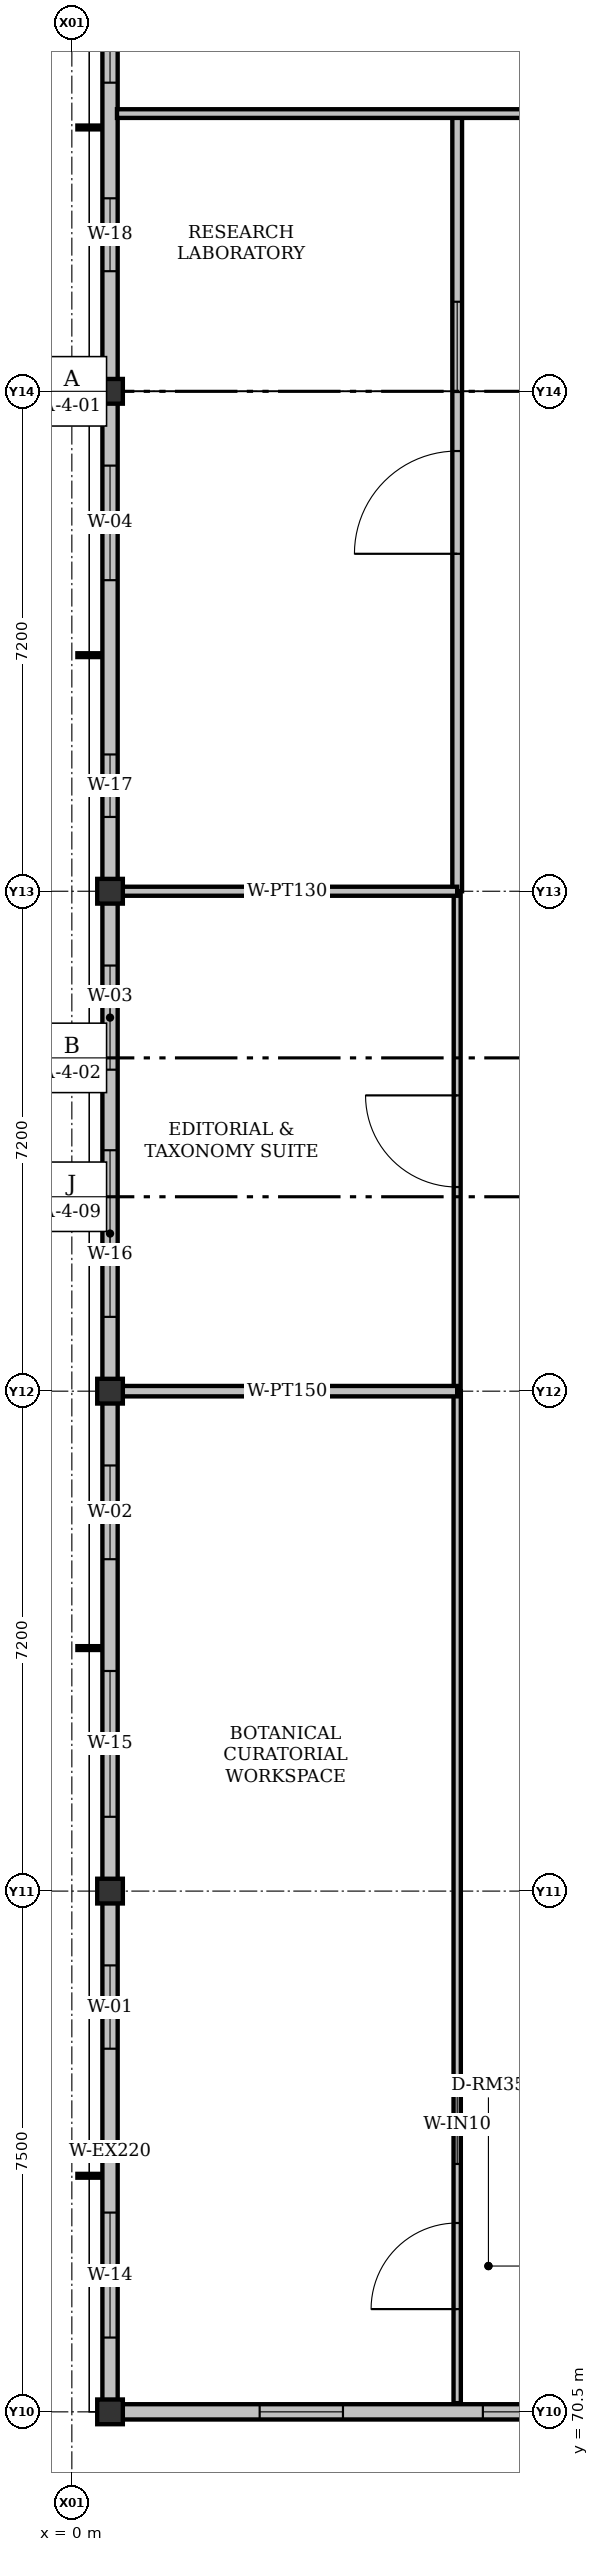
"""IFC4 building model, lengths in metres.
Left out: names, types, materials, properties, quantities, classifications, styles, units other than length and angle.
Written with IfcOpenShell. Run it as: python <this file> out.ifc"""

import sys

from ifc_helpers import new_model, si_unit, direction, frame, frame_2d, origin, origin_2d, place, context, subcontext, project, spatial, rectangle, i_section, extrude, element, fill, save


model = new_model("IFC4")
c1 = context("Model", 3, precision=1e-05, world=origin(), true_north=direction((0.0, 1.0)))
c2 = subcontext(c1, "Body", "Model", "MODEL_VIEW")
j1 = project(units=[si_unit("LENGTHUNIT", "METRE"), si_unit("PLANEANGLEUNIT", "RADIAN")], contexts=[c1])
p1 = place(None, origin())
s1 = spatial("IfcSite", under=j1, at=p1, CompositionType="ELEMENT")
p2 = place(p1, origin())
s2 = spatial("IfcBuilding", under=s1, at=p2, CompositionType="ELEMENT")
p3 = place(p2, frame((0.0, 0.0, 56.1)))
s3 = spatial("IfcBuildingStorey", under=s2, at=p3, CompositionType="ELEMENT", Elevation=56.1)
for number, where, z_axis, x_axis in (
    (1, (0.55, 70.5, 0.0), (0.0, 0.0, 1.0), (1.0, 0.0, 0.0)),
    (2, (0.55, 78.0, 0.0), (0.0, 0.0, 1.0), (1.0, 0.0, 0.0)),
    (3, (0.55, 85.2, 0.0), (0.0, 0.0, 1.0), (1.0, 0.0, 0.0)),
    (4, (0.55, 92.4, 0.0), (0.0, 0.0, 1.0), (1.0, 0.0, 0.0)),
    (5, (0.55, 99.6, 0.0), (0.0, 0.0, 1.0), (1.0, 0.0, 0.0)),
):
    element("IfcColumn", number, at=place(p3, frame(where, z_axis=z_axis, x_axis=x_axis)), inside=s3, PredefinedType="COLUMN", context=c2, shape_type="SweptSolid", body=[
        extrude(i_section(OverallWidth=0.369, OverallDepth=0.356, WebThickness=0.011, FlangeThickness=0.018, FilletRadius=0.015, at=origin_2d()), origin(), (0.0, 0.0, 1.0), 4.2),
    ])
p4 = place(p3, frame((0.55, 70.5, 0.0), z_axis=(0.0, 0.0, 1.0), x_axis=(0.0, 1.0, 0.0)))
e6 = element("IfcWall", 6, at=p4, inside=s3, PredefinedType="SOLIDWALL", context=c2, shape_type="SweptSolid", body=[
    extrude(rectangle(XDim=7.5, YDim=0.22, at=frame_2d((3.75, 0.0))), origin(), (0.0, 0.0, 1.0), 3.562),
])
p5 = place(p4, frame((1.07, 0.0, 0.92)))
e7 = element("IfcOpeningElement", 7, at=p5, cuts=e6, PredefinedType="OPENING", context=c2, shape_type="SweptSolid", body=[
    extrude(rectangle(XDim=1.8, YDim=1.7, at=frame_2d((0.9, 0.85))), frame((0.0, 0.11, 0.0), z_axis=(0.0, -1.0, 0.0), x_axis=(1.0, 0.0, 0.0)), (0.0, 0.0, 1.0), 0.22),
])
p6 = place(p4, frame((5.23, 0.0, 0.92)))
e8 = element("IfcOpeningElement", 8, at=p6, cuts=e6, PredefinedType="OPENING", context=c2, shape_type="SweptSolid", body=[
    extrude(rectangle(XDim=1.2, YDim=1.4, at=frame_2d((0.6, 0.7))), frame((0.0, 0.11, 0.0), z_axis=(0.0, -1.0, 0.0), x_axis=(1.0, 0.0, 0.0)), (0.0, 0.0, 1.0), 0.22),
])
p7 = place(p3, frame((0.55, 78.0, 0.0), z_axis=(0.0, 0.0, 1.0), x_axis=(0.0, 1.0, 0.0)))
e9 = element("IfcWall", 9, at=p7, inside=s3, PredefinedType="SOLIDWALL", context=c2, shape_type="SweptSolid", body=[
    extrude(rectangle(XDim=7.2, YDim=0.22, at=frame_2d((3.6, 0.0))), origin(), (0.0, 0.0, 1.0), 3.562),
])
p8 = place(p7, frame((1.07, 0.0, 0.92)))
e10 = element("IfcOpeningElement", 10, at=p8, cuts=e9, PredefinedType="OPENING", context=c2, shape_type="SweptSolid", body=[
    extrude(rectangle(XDim=2.1, YDim=1.7, at=frame_2d((1.05, 0.85))), frame((0.0, 0.11, 0.0), z_axis=(0.0, -1.0, 0.0), x_axis=(1.0, 0.0, 0.0)), (0.0, 0.0, 1.0), 0.22),
])
p9 = place(p7, frame((4.78, 0.0, 0.92)))
e11 = element("IfcOpeningElement", 11, at=p9, cuts=e9, PredefinedType="OPENING", context=c2, shape_type="SweptSolid", body=[
    extrude(rectangle(XDim=1.35, YDim=1.4, at=frame_2d((0.675, 0.7))), frame((0.0, 0.11, 0.0), z_axis=(0.0, -1.0, 0.0), x_axis=(1.0, 0.0, 0.0)), (0.0, 0.0, 1.0), 0.22),
])
p10 = place(p3, frame((0.55, 85.2, 0.0), z_axis=(0.0, 0.0, 1.0), x_axis=(0.0, 1.0, 0.0)))
e12 = element("IfcWall", 12, at=p10, inside=s3, PredefinedType="SOLIDWALL", context=c2, shape_type="SweptSolid", body=[
    extrude(rectangle(XDim=7.2, YDim=0.22, at=frame_2d((3.6, 0.0))), origin(), (0.0, 0.0, 1.0), 3.562),
])
p11 = place(p10, frame((1.07, 0.0, 0.92)))
e13 = element("IfcOpeningElement", 13, at=p11, cuts=e12, PredefinedType="OPENING", context=c2, shape_type="SweptSolid", body=[
    extrude(rectangle(XDim=2.4, YDim=1.7, at=frame_2d((1.2, 0.85))), frame((0.0, 0.11, 0.0), z_axis=(0.0, -1.0, 0.0), x_axis=(1.0, 0.0, 0.0)), (0.0, 0.0, 1.0), 0.22),
])
p12 = place(p10, frame((4.63, 0.0, 0.92)))
e14 = element("IfcOpeningElement", 14, at=p12, cuts=e12, PredefinedType="OPENING", context=c2, shape_type="SweptSolid", body=[
    extrude(rectangle(XDim=1.5, YDim=1.4, at=frame_2d((0.75, 0.7))), frame((0.0, 0.11, 0.0), z_axis=(0.0, -1.0, 0.0), x_axis=(1.0, 0.0, 0.0)), (0.0, 0.0, 1.0), 0.22),
])
p13 = place(p3, frame((0.55, 92.4, 0.0), z_axis=(0.0, 0.0, 1.0), x_axis=(0.0, 1.0, 0.0)))
e15 = element("IfcWall", 15, at=p13, inside=s3, PredefinedType="SOLIDWALL", context=c2, shape_type="SweptSolid", body=[
    extrude(rectangle(XDim=7.2, YDim=0.22, at=frame_2d((3.6, 0.0))), origin(), (0.0, 0.0, 1.0), 3.562),
])
p14 = place(p13, frame((1.07, 0.0, 0.92)))
e16 = element("IfcOpeningElement", 16, at=p14, cuts=e15, PredefinedType="OPENING", context=c2, shape_type="SweptSolid", body=[
    extrude(rectangle(XDim=0.9, YDim=1.3, at=frame_2d((0.45, 0.65))), frame((0.0, 0.11, 0.0), z_axis=(0.0, -1.0, 0.0), x_axis=(1.0, 0.0, 0.0)), (0.0, 0.0, 1.0), 0.22),
])
p15 = place(p13, frame((4.48, 0.0, 0.92)))
e17 = element("IfcOpeningElement", 17, at=p15, cuts=e15, PredefinedType="OPENING", context=c2, shape_type="SweptSolid", body=[
    extrude(rectangle(XDim=1.65, YDim=1.4, at=frame_2d((0.825, 0.7))), frame((0.0, 0.11, 0.0), z_axis=(0.0, -1.0, 0.0), x_axis=(1.0, 0.0, 0.0)), (0.0, 0.0, 1.0), 0.22),
])
p16 = place(p3, frame((0.55, 99.6, 0.0), z_axis=(0.0, 0.0, 1.0), x_axis=(0.0, 1.0, 0.0)))
e18 = element("IfcWall", 18, at=p16, inside=s3, PredefinedType="SOLIDWALL", context=c2, shape_type="SweptSolid", body=[
    extrude(rectangle(XDim=7.2, YDim=0.22, at=frame_2d((3.6, 0.0))), origin(), (0.0, 0.0, 1.0), 3.562),
])
p17 = place(p16, frame((1.73, 0.0, 0.92)))
e19 = element("IfcOpeningElement", 19, at=p17, cuts=e18, PredefinedType="OPENING", context=c2, shape_type="SweptSolid", body=[
    extrude(rectangle(XDim=1.05, YDim=1.3, at=frame_2d((0.525, 0.65))), frame((0.0, 0.11, 0.0), z_axis=(0.0, -1.0, 0.0), x_axis=(1.0, 0.0, 0.0)), (0.0, 0.0, 1.0), 0.22),
])
p18 = place(p16, frame((4.445, 0.0, 0.92)))
e20 = element("IfcOpeningElement", 20, at=p18, cuts=e18, PredefinedType="OPENING", context=c2, shape_type="SweptSolid", body=[
    extrude(rectangle(XDim=1.8, YDim=1.55, at=frame_2d((0.9, 0.775))), frame((0.0, 0.11, 0.0), z_axis=(0.0, -1.0, 0.0), x_axis=(1.0, 0.0, 0.0)), (0.0, 0.0, 1.0), 0.22),
])
p19 = place(p3, frame((7.85, 70.5, 0.0), z_axis=(0.0, 0.0, 1.0), x_axis=(-1.0, 0.0, 0.0)))
e21 = element("IfcWall", 21, at=p19, inside=s3, PredefinedType="SOLIDWALL", context=c2, shape_type="SweptSolid", body=[
    extrude(rectangle(XDim=7.3, YDim=0.22, at=frame_2d((3.65, 0.0))), origin(), (0.0, 0.0, 1.0), 3.562),
])
p20 = place(p19, frame((0.88, 0.0, 0.92)))
e22 = element("IfcOpeningElement", 22, at=p20, cuts=e21, PredefinedType="OPENING", context=c2, shape_type="SweptSolid", body=[
    extrude(rectangle(XDim=1.05, YDim=1.3, at=frame_2d((0.525, 0.65))), frame((0.0, 0.11, 0.0), z_axis=(0.0, -1.0, 0.0), x_axis=(1.0, 0.0, 0.0)), (0.0, 0.0, 1.0), 0.22),
])
p21 = place(p19, frame((3.945, 0.0, 0.92)))
e23 = element("IfcOpeningElement", 23, at=p21, cuts=e21, PredefinedType="OPENING", context=c2, shape_type="SweptSolid", body=[
    extrude(rectangle(XDim=1.2, YDim=1.4, at=frame_2d((0.6, 0.7))), frame((0.0, 0.11, 0.0), z_axis=(0.0, -1.0, 0.0), x_axis=(1.0, 0.0, 0.0)), (0.0, 0.0, 1.0), 0.22),
])
p22 = place(p3, frame((5.55, 70.625, 0.0), z_axis=(0.0, 0.0, 1.0), x_axis=(0.0, 1.0, 0.0)))
e24 = element("IfcWall", 24, at=p22, inside=s3, PredefinedType="PARTITIONING", context=c2, shape_type="SweptSolid", body=[
    extrude(rectangle(XDim=14.575, YDim=0.105, at=frame_2d((7.288, 0.0))), origin(), (0.0, 0.0, 1.0), 3.436),
])
p23 = place(p22, frame((1.355, 0.0, 0.0)))
e25 = element("IfcOpeningElement", 25, at=p23, cuts=e24, PredefinedType="OPENING", context=c2, shape_type="SweptSolid", body=[
    extrude(rectangle(XDim=1.24, YDim=2.18, at=frame_2d((0.62, 1.09))), frame((0.0, 0.052, 0.0), z_axis=(0.0, -1.0, 0.0), x_axis=(1.0, 0.0, 0.0)), (0.0, 0.0, 1.0), 0.105),
])
p24 = place(p22, frame((3.445, 0.0, 0.92)))
e26 = element("IfcOpeningElement", 26, at=p24, cuts=e24, PredefinedType="OPENING", context=c2, shape_type="SweptSolid", body=[
    extrude(rectangle(XDim=1.15, YDim=1.3, at=frame_2d((0.575, 0.65))), frame((0.0, 0.052, 0.0), z_axis=(0.0, -1.0, 0.0), x_axis=(1.0, 0.0, 0.0)), (0.0, 0.0, 1.0), 0.105),
])
p25 = place(p3, frame((5.55, 85.2, 0.0), z_axis=(0.0, 0.0, 1.0), x_axis=(0.0, 1.0, 0.0)))
e27 = element("IfcWall", 27, at=p25, inside=s3, PredefinedType="PARTITIONING", context=c2, shape_type="SweptSolid", body=[
    extrude(rectangle(XDim=7.2, YDim=0.1, at=frame_2d((3.6, 0.0))), origin(), (0.0, 0.0, 1.0), 3.436),
])
p26 = place(p25, frame((2.94, 0.0, 0.0)))
e28 = element("IfcOpeningElement", 28, at=p26, cuts=e27, PredefinedType="OPENING", context=c2, shape_type="SweptSolid", body=[
    extrude(rectangle(XDim=1.32, YDim=2.18, at=frame_2d((0.66, 1.09))), frame((0.0, 0.05, 0.0), z_axis=(0.0, -1.0, 0.0), x_axis=(1.0, 0.0, 0.0)), (0.0, 0.0, 1.0), 0.1),
])
p27 = place(p3, frame((0.65, 85.2, 0.0), z_axis=(0.0, 0.0, 1.0), x_axis=(1.0, 0.0, 0.0)))
e29 = element("IfcWall", 29, at=p27, inside=s3, PredefinedType="PARTITIONING", context=c2, shape_type="SweptSolid", body=[
    extrude(rectangle(XDim=4.9, YDim=0.15, at=frame_2d((2.45, 0.0))), origin(), (0.0, 0.0, 1.0), 3.436),
])
p28 = place(p3, frame((5.55, 92.4, 0.0), z_axis=(0.0, 0.0, 1.0), x_axis=(0.0, 1.0, 0.0)))
e30 = element("IfcWall", 30, at=p28, inside=s3, PredefinedType="PARTITIONING", context=c2, shape_type="SweptSolid", body=[
    extrude(rectangle(XDim=11.2, YDim=0.14, at=frame_2d((5.6, 0.0))), origin(), (0.0, 0.0, 1.0), 3.436),
])
p29 = place(p28, frame((4.86, 0.0, 0.0)))
e31 = element("IfcOpeningElement", 31, at=p29, cuts=e30, PredefinedType="OPENING", context=c2, shape_type="SweptSolid", body=[
    extrude(rectangle(XDim=1.48, YDim=2.28, at=frame_2d((0.74, 1.14))), frame((0.0, 0.07, 0.0), z_axis=(0.0, -1.0, 0.0), x_axis=(1.0, 0.0, 0.0)), (0.0, 0.0, 1.0), 0.14),
])
p30 = place(p28, frame((7.19, 0.0, 0.92)))
e32 = element("IfcOpeningElement", 32, at=p30, cuts=e30, PredefinedType="OPENING", context=c2, shape_type="SweptSolid", body=[
    extrude(rectangle(XDim=1.3, YDim=1.3, at=frame_2d((0.65, 0.65))), frame((0.0, 0.07, 0.0), z_axis=(0.0, -1.0, 0.0), x_axis=(1.0, 0.0, 0.0)), (0.0, 0.0, 1.0), 0.14),
])
p31 = place(p3, frame((0.65, 92.4, 0.0), z_axis=(0.0, 0.0, 1.0), x_axis=(1.0, 0.0, 0.0)))
e33 = element("IfcWall", 33, at=p31, inside=s3, PredefinedType="PARTITIONING", context=c2, shape_type="SweptSolid", body=[
    extrude(rectangle(XDim=4.9, YDim=0.13, at=frame_2d((2.45, 0.0))), origin(), (0.0, 0.0, 1.0), 3.436),
])
p32 = place(p3, frame((0.65, 103.6, 0.0), z_axis=(0.0, 0.0, 1.0), x_axis=(1.0, 0.0, 0.0)))
e34 = element("IfcWall", 34, at=p32, inside=s3, PredefinedType="PARTITIONING", context=c2, shape_type="SweptSolid", body=[
    extrude(rectangle(XDim=19.1, YDim=0.125, at=frame_2d((9.55, 0.0))), origin(), (0.0, 0.0, 1.0), 3.512),
])
p33 = place(p32, frame((9.11, 0.0, 0.0)))
e35 = element("IfcOpeningElement", 35, at=p33, cuts=e34, PredefinedType="OPENING", context=c2, shape_type="SweptSolid", body=[
    extrude(rectangle(XDim=1.68, YDim=2.35, at=frame_2d((0.84, 1.175))), frame((0.0, 0.062, 0.0), z_axis=(0.0, -1.0, 0.0), x_axis=(1.0, 0.0, 0.0)), (0.0, 0.0, 1.0), 0.125),
])
p34 = place(p32, frame((11.64, 0.0, 0.92)))
e36 = element("IfcOpeningElement", 36, at=p34, cuts=e34, PredefinedType="OPENING", context=c2, shape_type="SweptSolid", body=[
    extrude(rectangle(XDim=1.45, YDim=1.3, at=frame_2d((0.725, 0.65))), frame((0.0, 0.062, 0.0), z_axis=(0.0, -1.0, 0.0), x_axis=(1.0, 0.0, 0.0)), (0.0, 0.0, 1.0), 0.125),
])
p35 = place(p5, origin())
e37 = element("IfcWindow", 37, at=p35, inside=s3, PartitioningType="DOUBLE_PANEL_VERTICAL", PredefinedType="WINDOW", context=c2, shape_type="SweptSolid", body=[
    extrude(rectangle(XDim=1.8, YDim=1.7, at=frame_2d((0.9, 0.85))), frame((0.0, 0.03, 0.0), z_axis=(0.0, -1.0, 0.0), x_axis=(1.0, 0.0, 0.0)), (0.0, 0.0, 1.0), 0.06),
])
fill(e7, e37)
p36 = place(p6, origin())
e38 = element("IfcWindow", 38, at=p36, inside=s3, PartitioningType="SINGLE_PANEL", PredefinedType="WINDOW", context=c2, shape_type="SweptSolid", body=[
    extrude(rectangle(XDim=1.2, YDim=1.4, at=frame_2d((0.6, 0.7))), frame((0.0, 0.03, 0.0), z_axis=(0.0, -1.0, 0.0), x_axis=(1.0, 0.0, 0.0)), (0.0, 0.0, 1.0), 0.06),
])
fill(e8, e38)
p37 = place(p8, origin())
e39 = element("IfcWindow", 39, at=p37, inside=s3, PartitioningType="DOUBLE_PANEL_VERTICAL", PredefinedType="WINDOW", context=c2, shape_type="SweptSolid", body=[
    extrude(rectangle(XDim=2.1, YDim=1.7, at=frame_2d((1.05, 0.85))), frame((0.0, 0.03, 0.0), z_axis=(0.0, -1.0, 0.0), x_axis=(1.0, 0.0, 0.0)), (0.0, 0.0, 1.0), 0.06),
])
fill(e10, e39)
p38 = place(p9, origin())
e40 = element("IfcWindow", 40, at=p38, inside=s3, PartitioningType="SINGLE_PANEL", PredefinedType="WINDOW", context=c2, shape_type="SweptSolid", body=[
    extrude(rectangle(XDim=1.35, YDim=1.4, at=frame_2d((0.675, 0.7))), frame((0.0, 0.03, 0.0), z_axis=(0.0, -1.0, 0.0), x_axis=(1.0, 0.0, 0.0)), (0.0, 0.0, 1.0), 0.06),
])
fill(e11, e40)
p39 = place(p11, origin())
e41 = element("IfcWindow", 41, at=p39, inside=s3, PartitioningType="DOUBLE_PANEL_VERTICAL", PredefinedType="WINDOW", context=c2, shape_type="SweptSolid", body=[
    extrude(rectangle(XDim=2.4, YDim=1.7, at=frame_2d((1.2, 0.85))), frame((0.0, 0.03, 0.0), z_axis=(0.0, -1.0, 0.0), x_axis=(1.0, 0.0, 0.0)), (0.0, 0.0, 1.0), 0.06),
])
fill(e13, e41)
p40 = place(p12, origin())
e42 = element("IfcWindow", 42, at=p40, inside=s3, PartitioningType="SINGLE_PANEL", PredefinedType="WINDOW", context=c2, shape_type="SweptSolid", body=[
    extrude(rectangle(XDim=1.5, YDim=1.4, at=frame_2d((0.75, 0.7))), frame((0.0, 0.03, 0.0), z_axis=(0.0, -1.0, 0.0), x_axis=(1.0, 0.0, 0.0)), (0.0, 0.0, 1.0), 0.06),
])
fill(e14, e42)
p41 = place(p14, origin())
e43 = element("IfcWindow", 43, at=p41, inside=s3, PartitioningType="SINGLE_PANEL", PredefinedType="WINDOW", context=c2, shape_type="SweptSolid", body=[
    extrude(rectangle(XDim=0.9, YDim=1.3, at=frame_2d((0.45, 0.65))), frame((0.0, 0.03, 0.0), z_axis=(0.0, -1.0, 0.0), x_axis=(1.0, 0.0, 0.0)), (0.0, 0.0, 1.0), 0.06),
])
fill(e16, e43)
p42 = place(p15, origin())
e44 = element("IfcWindow", 44, at=p42, inside=s3, PartitioningType="DOUBLE_PANEL_VERTICAL", PredefinedType="WINDOW", context=c2, shape_type="SweptSolid", body=[
    extrude(rectangle(XDim=1.65, YDim=1.4, at=frame_2d((0.825, 0.7))), frame((0.0, 0.03, 0.0), z_axis=(0.0, -1.0, 0.0), x_axis=(1.0, 0.0, 0.0)), (0.0, 0.0, 1.0), 0.06),
])
fill(e17, e44)
p43 = place(p17, origin())
e45 = element("IfcWindow", 45, at=p43, inside=s3, PartitioningType="SINGLE_PANEL", PredefinedType="WINDOW", context=c2, shape_type="SweptSolid", body=[
    extrude(rectangle(XDim=1.05, YDim=1.3, at=frame_2d((0.525, 0.65))), frame((0.0, 0.03, 0.0), z_axis=(0.0, -1.0, 0.0), x_axis=(1.0, 0.0, 0.0)), (0.0, 0.0, 1.0), 0.06),
])
fill(e19, e45)
p44 = place(p18, origin())
e46 = element("IfcWindow", 46, at=p44, inside=s3, PartitioningType="DOUBLE_PANEL_VERTICAL", PredefinedType="WINDOW", context=c2, shape_type="SweptSolid", body=[
    extrude(rectangle(XDim=1.8, YDim=1.55, at=frame_2d((0.9, 0.775))), frame((0.0, 0.03, 0.0), z_axis=(0.0, -1.0, 0.0), x_axis=(1.0, 0.0, 0.0)), (0.0, 0.0, 1.0), 0.06),
])
fill(e20, e46)
p45 = place(p20, origin())
e47 = element("IfcWindow", 47, at=p45, inside=s3, PartitioningType="SINGLE_PANEL", PredefinedType="WINDOW", context=c2, shape_type="SweptSolid", body=[
    extrude(rectangle(XDim=1.05, YDim=1.3, at=frame_2d((0.525, 0.65))), frame((0.0, 0.03, 0.0), z_axis=(0.0, -1.0, 0.0), x_axis=(1.0, 0.0, 0.0)), (0.0, 0.0, 1.0), 0.06),
])
fill(e22, e47)
p46 = place(p21, origin())
e48 = element("IfcWindow", 48, at=p46, inside=s3, PartitioningType="SINGLE_PANEL", PredefinedType="WINDOW", context=c2, shape_type="SweptSolid", body=[
    extrude(rectangle(XDim=1.2, YDim=1.4, at=frame_2d((0.6, 0.7))), frame((0.0, 0.03, 0.0), z_axis=(0.0, -1.0, 0.0), x_axis=(1.0, 0.0, 0.0)), (0.0, 0.0, 1.0), 0.06),
])
fill(e23, e48)
p47 = place(p23, origin())
e49 = element("IfcDoor", 49, at=p47, inside=s3, OperationType="SINGLE_SWING_LEFT", PredefinedType="DOOR", context=c2, shape_type="SweptSolid", body=[
    extrude(rectangle(XDim=1.24, YDim=2.18, at=frame_2d((0.62, 1.09))), frame((0.0, 0.025, 0.0), z_axis=(0.0, -1.0, 0.0), x_axis=(1.0, 0.0, 0.0)), (0.0, 0.0, 1.0), 0.05),
])
fill(e25, e49)
p48 = place(p24, origin())
e50 = element("IfcWindow", 50, at=p48, inside=s3, PartitioningType="SINGLE_PANEL", PredefinedType="WINDOW", context=c2, shape_type="SweptSolid", body=[
    extrude(rectangle(XDim=1.15, YDim=1.3, at=frame_2d((0.575, 0.65))), frame((0.0, 0.03, 0.0), z_axis=(0.0, -1.0, 0.0), x_axis=(1.0, 0.0, 0.0)), (0.0, 0.0, 1.0), 0.06),
])
fill(e26, e50)
p49 = place(p26, origin())
e51 = element("IfcDoor", 51, at=p49, inside=s3, OperationType="SINGLE_SWING_RIGHT", PredefinedType="DOOR", context=c2, shape_type="SweptSolid", body=[
    extrude(rectangle(XDim=1.32, YDim=2.18, at=frame_2d((0.66, 1.09))), frame((0.0, 0.025, 0.0), z_axis=(0.0, -1.0, 0.0), x_axis=(1.0, 0.0, 0.0)), (0.0, 0.0, 1.0), 0.05),
])
fill(e28, e51)
p50 = place(p29, origin())
e52 = element("IfcDoor", 52, at=p50, inside=s3, OperationType="SINGLE_SWING_LEFT", PredefinedType="DOOR", context=c2, shape_type="SweptSolid", body=[
    extrude(rectangle(XDim=1.48, YDim=2.28, at=frame_2d((0.74, 1.14))), frame((0.0, 0.025, 0.0), z_axis=(0.0, -1.0, 0.0), x_axis=(1.0, 0.0, 0.0)), (0.0, 0.0, 1.0), 0.05),
])
fill(e31, e52)
p51 = place(p30, origin())
e53 = element("IfcWindow", 53, at=p51, inside=s3, PartitioningType="SINGLE_PANEL", PredefinedType="WINDOW", context=c2, shape_type="SweptSolid", body=[
    extrude(rectangle(XDim=1.3, YDim=1.3, at=frame_2d((0.65, 0.65))), frame((0.0, 0.03, 0.0), z_axis=(0.0, -1.0, 0.0), x_axis=(1.0, 0.0, 0.0)), (0.0, 0.0, 1.0), 0.06),
])
fill(e32, e53)
save(model, sys.argv[1])
